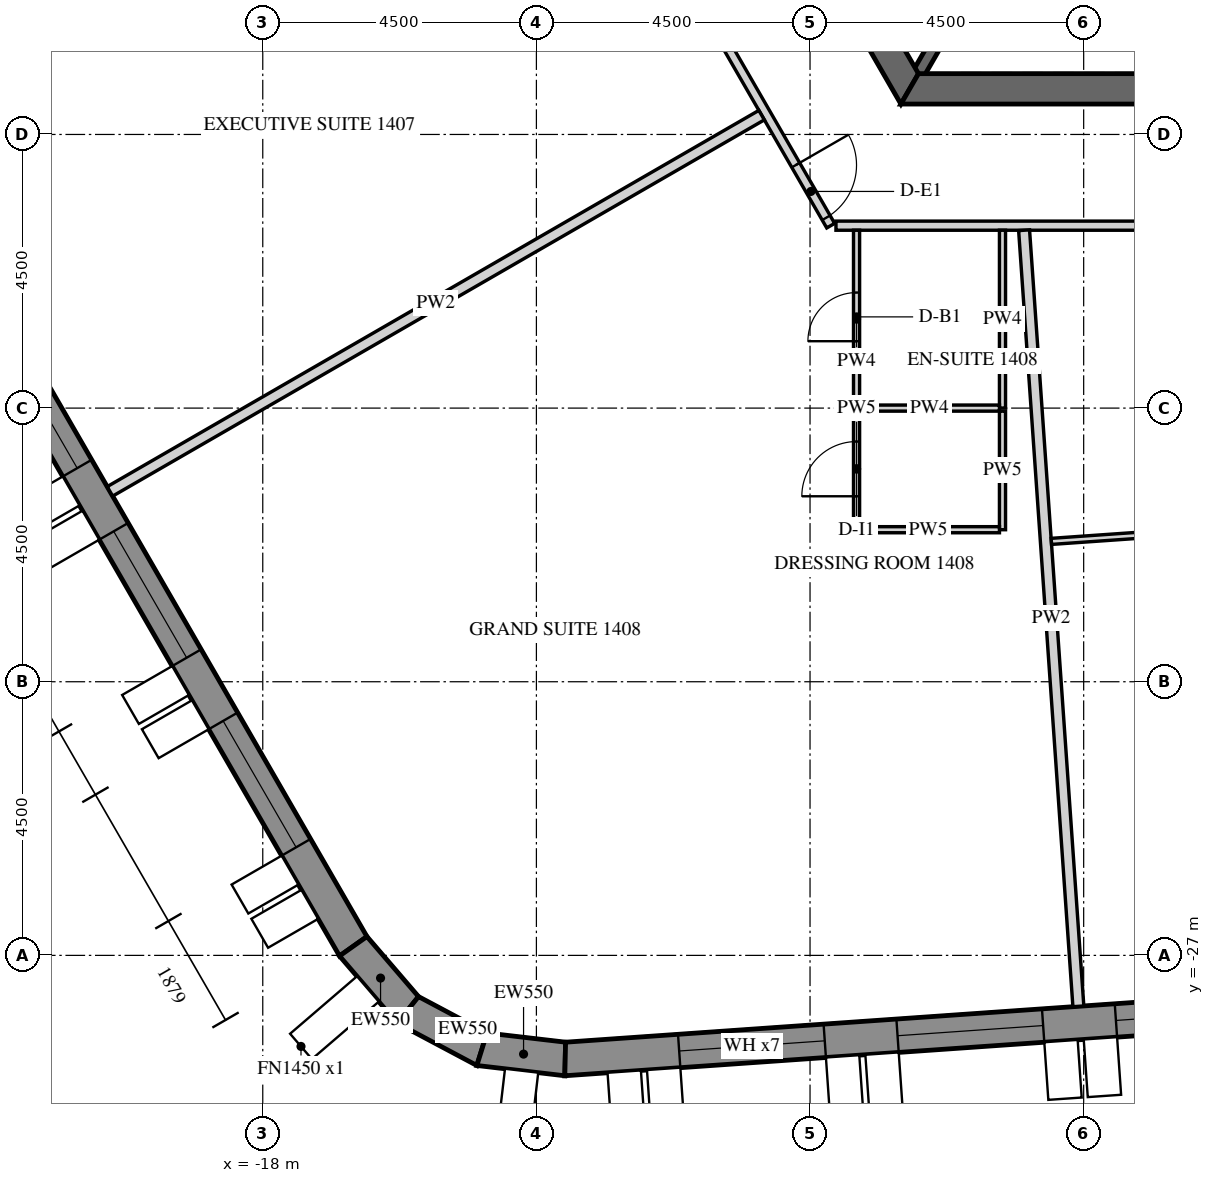
"""IFC4 building model, lengths in metres.
Left out: names, types, materials, properties, quantities, classifications, styles, units other than length and angle.
Written with IfcOpenShell. Run it as: python <this file> out.ifc"""

import sys

from ifc_helpers import new_model, si_unit, direction, frame, frame_2d, origin, place, context, subcontext, project, spatial, polyline, rectangle, outline, extrude, element, fill, save


model = new_model("IFC4")
c1 = context("Model", 3, precision=1e-05, world=origin(), true_north=direction((0.0, 1.0)))
c2 = subcontext(c1, "Body", "Model", "MODEL_VIEW")
j1 = project(units=[si_unit("LENGTHUNIT", "METRE"), si_unit("PLANEANGLEUNIT", "RADIAN")], contexts=[c1])
p1 = place(None, origin())
s1 = spatial("IfcSite", under=j1, at=p1, CompositionType="ELEMENT")
p2 = place(p1, origin())
s2 = spatial("IfcBuilding", under=s1, at=p2, CompositionType="ELEMENT")
p3 = place(p2, frame((0.0, 0.0, 183.9)))
s3 = spatial("IfcBuildingStorey", under=s2, at=p3, CompositionType="ELEMENT", Elevation=183.9)
p4 = place(p3, frame((-30.391, -2.811, -0.15), z_axis=(0.0, 0.0, 1.0), x_axis=(0.499998569178, -0.866026229868, 0.0)))
e1 = element("IfcWall", 1, at=p4, inside=s3, PredefinedType="SOLIDWALL", context=c2, shape_type="SweptSolid", body=[
    extrude(outline(polyline([(-0.022, -0.275), (27.783, -0.275), (27.732, 0.275), (0.022, 0.275), (-0.022, -0.275)])), origin(), (0.0, 0.0, 1.0), 3.9),
])
p5 = place(p4, frame((1.879, 0.0, 1.05)))
e2 = element("IfcOpeningElement", 2, at=p5, cuts=e1, PredefinedType="OPENING", context=c2, shape_type="SweptSolid", body=[
    extrude(rectangle(XDim=2.4, YDim=2.4, at=frame_2d((1.2, 1.2))), frame((0.0, 0.285, 0.0), z_axis=(0.0, -1.0, 0.0), x_axis=(1.0, 0.0, 0.0)), (0.0, 0.0, 1.0), 0.57),
])
p6 = place(p4, frame((5.479, 0.0, 1.05)))
e3 = element("IfcOpeningElement", 3, at=p6, cuts=e1, PredefinedType="OPENING", context=c2, shape_type="SweptSolid", body=[
    extrude(rectangle(XDim=2.4, YDim=2.4, at=frame_2d((1.2, 1.2))), frame((0.0, 0.285, 0.0), z_axis=(0.0, -1.0, 0.0), x_axis=(1.0, 0.0, 0.0)), (0.0, 0.0, 1.0), 0.57),
])
p7 = place(p4, frame((9.079, 0.0, 1.05)))
e4 = element("IfcOpeningElement", 4, at=p7, cuts=e1, PredefinedType="OPENING", context=c2, shape_type="SweptSolid", body=[
    extrude(rectangle(XDim=2.4, YDim=2.4, at=frame_2d((1.2, 1.2))), frame((0.0, 0.285, 0.0), z_axis=(0.0, -1.0, 0.0), x_axis=(1.0, 0.0, 0.0)), (0.0, 0.0, 1.0), 0.57),
])
p8 = place(p4, frame((12.679, 0.0, 1.05)))
e5 = element("IfcOpeningElement", 5, at=p8, cuts=e1, PredefinedType="OPENING", context=c2, shape_type="SweptSolid", body=[
    extrude(rectangle(XDim=2.4, YDim=2.4, at=frame_2d((1.2, 1.2))), frame((0.0, 0.285, 0.0), z_axis=(0.0, -1.0, 0.0), x_axis=(1.0, 0.0, 0.0)), (0.0, 0.0, 1.0), 0.57),
])
p9 = place(p4, frame((16.279, 0.0, 1.05)))
e6 = element("IfcOpeningElement", 6, at=p9, cuts=e1, PredefinedType="OPENING", context=c2, shape_type="SweptSolid", body=[
    extrude(rectangle(XDim=2.4, YDim=2.4, at=frame_2d((1.2, 1.2))), frame((0.0, 0.285, 0.0), z_axis=(0.0, -1.0, 0.0), x_axis=(1.0, 0.0, 0.0)), (0.0, 0.0, 1.0), 0.57),
])
p10 = place(p4, frame((19.879, 0.0, 1.05)))
e7 = element("IfcOpeningElement", 7, at=p10, cuts=e1, PredefinedType="OPENING", context=c2, shape_type="SweptSolid", body=[
    extrude(rectangle(XDim=2.4, YDim=2.4, at=frame_2d((1.2, 1.2))), frame((0.0, 0.285, 0.0), z_axis=(0.0, -1.0, 0.0), x_axis=(1.0, 0.0, 0.0)), (0.0, 0.0, 1.0), 0.57),
])
p11 = place(p4, frame((23.479, 0.0, 1.05)))
e8 = element("IfcOpeningElement", 8, at=p11, cuts=e1, PredefinedType="OPENING", context=c2, shape_type="SweptSolid", body=[
    extrude(rectangle(XDim=2.4, YDim=2.4, at=frame_2d((1.2, 1.2))), frame((0.0, 0.285, 0.0), z_axis=(0.0, -1.0, 0.0), x_axis=(1.0, 0.0, 0.0)), (0.0, 0.0, 1.0), 0.57),
])
p12 = place(p3, frame((-16.512, -26.85, -0.15), z_axis=(0.0, 0.0, 1.0), x_axis=(0.651621950847, -0.758543890078, 0.0)))
e9 = element("IfcWall", 9, at=p12, inside=s3, PredefinedType="SOLIDWALL", context=c2, shape_type="SweptSolid", body=[
    extrude(outline(polyline([(-0.026, -0.275), (1.431, -0.275), (1.327, 0.275), (0.026, 0.275), (-0.026, -0.275)])), origin(), (0.0, 0.0, 1.0), 3.9),
])
p13 = place(p3, frame((-15.614, -27.896, -0.15), z_axis=(0.0, 0.0, 1.0), x_axis=(0.882994189209, -0.469383917304, 0.0)))
e10 = element("IfcWall", 10, at=p13, inside=s3, PredefinedType="SOLIDWALL", context=c2, shape_type="SweptSolid", body=[
    extrude(outline(polyline([(-0.052, -0.275), (1.431, -0.275), (1.327, 0.275), (0.052, 0.275), (-0.052, -0.275)])), origin(), (0.0, 0.0, 1.0), 3.9),
])
p14 = place(p3, frame((-14.396, -28.543, -0.15), z_axis=(0.0, 0.0, 1.0), x_axis=(0.993232537394, -0.11614269956, 0.0)))
e11 = element("IfcWall", 11, at=p14, inside=s3, PredefinedType="SOLIDWALL", context=c2, shape_type="SweptSolid", body=[
    extrude(outline(polyline([(-0.052, -0.275), (1.405, -0.275), (1.353, 0.275), (0.052, 0.275), (-0.052, -0.275)])), origin(), (0.0, 0.0, 1.0), 3.9),
])
p15 = place(p3, frame((-13.026, -28.704, -0.15), z_axis=(0.0, 0.0, 1.0), x_axis=(0.99756406806, 0.069756219185, 0.0)))
e12 = element("IfcWall", 12, at=p15, inside=s3, PredefinedType="SOLIDWALL", context=c2, shape_type="SweptSolid", body=[
    extrude(outline(polyline([(-0.026, -0.275), (27.78, -0.275), (27.735, 0.275), (0.026, 0.275), (-0.026, -0.275)])), origin(), (0.0, 0.0, 1.0), 3.9),
])
p16 = place(p15, frame((1.879, 0.0, 1.05)))
e13 = element("IfcOpeningElement", 13, at=p16, cuts=e12, PredefinedType="OPENING", context=c2, shape_type="SweptSolid", body=[
    extrude(rectangle(XDim=2.4, YDim=2.4, at=frame_2d((1.2, 1.2))), frame((0.0, 0.285, 0.0), z_axis=(0.0, -1.0, 0.0), x_axis=(1.0, 0.0, 0.0)), (0.0, 0.0, 1.0), 0.57),
])
p17 = place(p15, frame((5.479, 0.0, 1.05)))
e14 = element("IfcOpeningElement", 14, at=p17, cuts=e12, PredefinedType="OPENING", context=c2, shape_type="SweptSolid", body=[
    extrude(rectangle(XDim=2.4, YDim=2.4, at=frame_2d((1.2, 1.2))), frame((0.0, 0.285, 0.0), z_axis=(0.0, -1.0, 0.0), x_axis=(1.0, 0.0, 0.0)), (0.0, 0.0, 1.0), 0.57),
])
p18 = place(p15, frame((9.079, 0.0, 1.05)))
e15 = element("IfcOpeningElement", 15, at=p18, cuts=e12, PredefinedType="OPENING", context=c2, shape_type="SweptSolid", body=[
    extrude(rectangle(XDim=2.4, YDim=2.4, at=frame_2d((1.2, 1.2))), frame((0.0, 0.285, 0.0), z_axis=(0.0, -1.0, 0.0), x_axis=(1.0, 0.0, 0.0)), (0.0, 0.0, 1.0), 0.57),
])
p19 = place(p15, frame((12.679, 0.0, 1.05)))
e16 = element("IfcOpeningElement", 16, at=p19, cuts=e12, PredefinedType="OPENING", context=c2, shape_type="SweptSolid", body=[
    extrude(rectangle(XDim=2.4, YDim=2.4, at=frame_2d((1.2, 1.2))), frame((0.0, 0.285, 0.0), z_axis=(0.0, -1.0, 0.0), x_axis=(1.0, 0.0, 0.0)), (0.0, 0.0, 1.0), 0.57),
])
p20 = place(p15, frame((16.279, 0.0, 1.05)))
e17 = element("IfcOpeningElement", 17, at=p20, cuts=e12, PredefinedType="OPENING", context=c2, shape_type="SweptSolid", body=[
    extrude(rectangle(XDim=2.4, YDim=2.4, at=frame_2d((1.2, 1.2))), frame((0.0, 0.285, 0.0), z_axis=(0.0, -1.0, 0.0), x_axis=(1.0, 0.0, 0.0)), (0.0, 0.0, 1.0), 0.57),
])
p21 = place(p15, frame((19.879, 0.0, 1.05)))
e18 = element("IfcOpeningElement", 18, at=p21, cuts=e12, PredefinedType="OPENING", context=c2, shape_type="SweptSolid", body=[
    extrude(rectangle(XDim=2.4, YDim=2.4, at=frame_2d((1.2, 1.2))), frame((0.0, 0.285, 0.0), z_axis=(0.0, -1.0, 0.0), x_axis=(1.0, 0.0, 0.0)), (0.0, 0.0, 1.0), 0.57),
])
p22 = place(p15, frame((23.479, 0.0, 1.05)))
e19 = element("IfcOpeningElement", 19, at=p22, cuts=e12, PredefinedType="OPENING", context=c2, shape_type="SweptSolid", body=[
    extrude(rectangle(XDim=2.4, YDim=2.4, at=frame_2d((1.2, 1.2))), frame((0.0, 0.285, 0.0), z_axis=(0.0, -1.0, 0.0), x_axis=(1.0, 0.0, 0.0)), (0.0, 0.0, 1.0), 0.57),
])
p23 = place(p3, frame((-14.722, 0.0, -0.15), z_axis=(0.0, 0.0, 1.0), x_axis=(0.50000571537, -0.866022103989, 0.0)))
e20 = element("IfcWall", 20, at=p23, inside=s3, PredefinedType="SHEAR", context=c2, shape_type="SweptSolid", body=[
    extrude(outline(polyline([(-0.144, -0.25), (14.867, -0.25), (14.578, 0.25), (0.144, 0.25), (-0.144, -0.25)])), origin(), (0.0, 0.0, 1.0), 3.9),
])
p24 = place(p23, frame((6.432, 0.0, 0.15)))
e21 = element("IfcOpeningElement", 21, at=p24, cuts=e20, PredefinedType="OPENING", context=c2, shape_type="SweptSolid", body=[
    extrude(rectangle(XDim=1.8, YDim=2.4, at=frame_2d((0.9, 1.2))), frame((0.0, 0.26, 0.0), z_axis=(0.0, -1.0, 0.0), x_axis=(1.0, 0.0, 0.0)), (0.0, 0.0, 1.0), 0.52),
])
p25 = place(p3, frame((-7.361, -12.75, -0.15), z_axis=(0.0, 0.0, 1.0), x_axis=(1.0, 0.0, 0.0)))
e22 = element("IfcWall", 22, at=p25, inside=s3, PredefinedType="SHEAR", context=c2, shape_type="SweptSolid", body=[
    extrude(outline(polyline([(-0.144, -0.25), (14.866, -0.25), (14.578, 0.25), (0.144, 0.25), (-0.144, -0.25)])), origin(), (0.0, 0.0, 1.0), 3.9),
])
p26 = place(p25, frame((6.761, 0.0, 0.15)))
e23 = element("IfcOpeningElement", 23, at=p26, cuts=e22, PredefinedType="OPENING", context=c2, shape_type="SweptSolid", body=[
    extrude(rectangle(XDim=1.2, YDim=2.4, at=frame_2d((0.6, 1.2))), frame((0.0, 0.26, 0.0), z_axis=(0.0, -1.0, 0.0), x_axis=(1.0, 0.0, 0.0)), (0.0, 0.0, 1.0), 0.52),
])
p27 = place(p3, frame((-5.773, -10.0, -0.15), z_axis=(0.0, 0.0, 1.0), x_axis=(-0.499995765644, -0.866027848477, 0.0)))
e24 = element("IfcWall", 24, at=p27, inside=s3, PredefinedType="SHEAR", context=c2, shape_type="SweptSolid", body=[
    extrude(rectangle(XDim=2.887, YDim=0.2, at=frame_2d((1.443, 0.0))), origin(), (0.0, 0.0, 1.0), 3.9),
])
p28 = place(p3, frame((-16.094, -2.125, 0.0), z_axis=(0.0, 0.0, 1.0), x_axis=(0.500010545262, -0.866019315389, 0.0)))
e25 = element("IfcWall", 25, at=p28, inside=s3, PredefinedType="PARTITIONING", context=c2, shape_type="SweptSolid", body=[
    extrude(rectangle(XDim=14.867, YDim=0.15, at=frame_2d((7.434, 0.0))), origin(), (0.0, 0.0, 1.0), 2.988),
])
p29 = place(p28, frame((1.019, 0.0, 0.0)))
e26 = element("IfcOpeningElement", 26, at=p29, cuts=e25, PredefinedType="OPENING", context=c2, shape_type="SweptSolid", body=[
    extrude(rectangle(XDim=1.0, YDim=2.1, at=frame_2d((0.5, 1.05))), frame((0.0, 0.085, 0.0), z_axis=(0.0, -1.0, 0.0), x_axis=(1.0, 0.0, 0.0)), (0.0, 0.0, 1.0), 0.17),
])
p30 = place(p28, frame((9.824, 0.0, 0.0)))
e27 = element("IfcOpeningElement", 27, at=p30, cuts=e25, PredefinedType="OPENING", context=c2, shape_type="SweptSolid", body=[
    extrude(rectangle(XDim=1.0, YDim=2.1, at=frame_2d((0.5, 1.05))), frame((0.0, 0.085, 0.0), z_axis=(0.0, -1.0, 0.0), x_axis=(1.0, 0.0, 0.0)), (0.0, 0.0, 1.0), 0.17),
])
p31 = place(p28, frame((13.717, 0.0, 0.0)))
e28 = element("IfcOpeningElement", 28, at=p31, cuts=e25, PredefinedType="OPENING", context=c2, shape_type="SweptSolid", body=[
    extrude(rectangle(XDim=1.0, YDim=2.1, at=frame_2d((0.5, 1.05))), frame((0.0, 0.085, 0.0), z_axis=(0.0, -1.0, 0.0), x_axis=(1.0, 0.0, 0.0)), (0.0, 0.0, 1.0), 0.17),
])
p32 = place(p3, frame((-8.574, -15.0, 0.0), z_axis=(0.0, 0.0, 1.0), x_axis=(1.0, 0.0, 0.0)))
e29 = element("IfcWall", 29, at=p32, inside=s3, PredefinedType="PARTITIONING", context=c2, shape_type="SweptSolid", body=[
    extrude(rectangle(XDim=14.78, YDim=0.15, at=frame_2d((7.39, 0.0))), origin(), (0.0, 0.0, 1.0), 2.988),
])
p33 = place(p32, frame((7.081, 0.0, 0.0)))
e30 = element("IfcOpeningElement", 30, at=p33, cuts=e29, PredefinedType="OPENING", context=c2, shape_type="SweptSolid", body=[
    extrude(rectangle(XDim=1.0, YDim=2.1, at=frame_2d((0.5, 1.05))), frame((0.0, 0.085, 0.0), z_axis=(0.0, -1.0, 0.0), x_axis=(1.0, 0.0, 0.0)), (0.0, 0.0, 1.0), 0.17),
])
for number, where, z_axis, x_axis in (
    (31, (-24.114, -13.134, 0.0), (0.0, 0.0, 1.0), (0.866, 0.5, 0.0)),
    (32, (-20.513, -19.37, 0.0), (0.0, 0.0, 1.0), (0.866, 0.5, 0.0)),
):
    element("IfcWall", number, at=place(p3, frame(where, z_axis=z_axis, x_axis=x_axis)), inside=s3, PredefinedType="PARTITIONING", context=c2, shape_type="SweptSolid", body=[
        extrude(rectangle(XDim=12.375, YDim=0.18, at=frame_2d((6.188, 0.0))), origin(), (0.0, 0.0, 1.0), 2.988),
    ])
p34 = place(p3, frame((-8.235, -18.0, 0.0), z_axis=(0.0, 0.0, 1.0), x_axis=(0.0, 1.0, 0.0)))
e33 = element("IfcWall", 33, at=p34, inside=s3, PredefinedType="PARTITIONING", context=c2, shape_type="SweptSolid", body=[
    extrude(rectangle(XDim=2.925, YDim=0.1, at=frame_2d((1.462, 0.0))), origin(), (0.0, 0.0, 1.0), 2.988),
])
p35 = place(p34, frame((1.1, 0.0, 0.0)))
e34 = element("IfcOpeningElement", 34, at=p35, cuts=e33, PredefinedType="OPENING", context=c2, shape_type="SweptSolid", body=[
    extrude(rectangle(XDim=0.8, YDim=2.1, at=frame_2d((0.4, 1.05))), frame((0.0, 0.06, 0.0), z_axis=(0.0, -1.0, 0.0), x_axis=(1.0, 0.0, 0.0)), (0.0, 0.0, 1.0), 0.12),
])
p36 = place(p3, frame((-5.835, -15.075, 0.0), z_axis=(0.0, 0.0, 1.0), x_axis=(0.0, -1.0, 0.0)))
e35 = element("IfcWall", 35, at=p36, inside=s3, PredefinedType="PARTITIONING", context=c2, shape_type="SweptSolid", body=[
    extrude(rectangle(XDim=2.925, YDim=0.1, at=frame_2d((1.462, 0.0))), origin(), (0.0, 0.0, 1.0), 2.988),
])
p37 = place(p3, frame((-5.835, -18.05, 0.0), z_axis=(0.0, 0.0, 1.0), x_axis=(0.0, -1.0, 0.0)))
e36 = element("IfcWall", 36, at=p37, inside=s3, PredefinedType="PARTITIONING", context=c2, shape_type="SweptSolid", body=[
    extrude(rectangle(XDim=1.95, YDim=0.1, at=frame_2d((0.975, 0.0))), origin(), (0.0, 0.0, 1.0), 2.988),
])
p38 = place(p3, frame((-5.885, -20.0, 0.0), z_axis=(0.0, 0.0, 1.0), x_axis=(-1.0, 0.0, 0.0)))
e37 = element("IfcWall", 37, at=p38, inside=s3, PredefinedType="PARTITIONING", context=c2, shape_type="SweptSolid", body=[
    extrude(rectangle(XDim=2.35, YDim=0.1, at=frame_2d((1.175, 0.0))), origin(), (0.0, 0.0, 1.0), 2.988),
])
p39 = place(p3, frame((-8.235, -19.95, 0.0), z_axis=(0.0, 0.0, 1.0), x_axis=(0.0, 1.0, 0.0)))
e38 = element("IfcWall", 38, at=p39, inside=s3, PredefinedType="PARTITIONING", context=c2, shape_type="SweptSolid", body=[
    extrude(rectangle(XDim=1.9, YDim=0.1, at=frame_2d((0.95, 0.0))), origin(), (0.0, 0.0, 1.0), 2.988),
])
p40 = place(p39, frame((0.5, 0.0, 0.0)))
e39 = element("IfcOpeningElement", 39, at=p40, cuts=e38, PredefinedType="OPENING", context=c2, shape_type="SweptSolid", body=[
    extrude(rectangle(XDim=0.9, YDim=2.1, at=frame_2d((0.45, 1.05))), frame((0.0, 0.06, 0.0), z_axis=(0.0, -1.0, 0.0), x_axis=(1.0, 0.0, 0.0)), (0.0, 0.0, 1.0), 0.12),
])
p41 = place(p3, frame((-4.587, -27.838, 0.0), z_axis=(0.0, 0.0, 1.0), x_axis=(-0.069764754112, 0.997563471206, 0.0)))
e40 = element("IfcWall", 40, at=p41, inside=s3, PredefinedType="PARTITIONING", context=c2, shape_type="SweptSolid", body=[
    extrude(rectangle(XDim=12.794, YDim=0.18, at=frame_2d((6.397, 0.0))), origin(), (0.0, 0.0, 1.0), 2.988),
])
p42 = place(p3, frame((-8.185, -18.0, 0.0), z_axis=(0.0, 0.0, 1.0), x_axis=(1.0, 0.0, 0.0)))
e41 = element("IfcWall", 41, at=p42, inside=s3, PredefinedType="PARTITIONING", context=c2, shape_type="SweptSolid", body=[
    extrude(rectangle(XDim=2.3, YDim=0.1, at=frame_2d((1.15, 0.0))), origin(), (0.0, 0.0, 1.0), 2.988),
])
p43 = place(p3, frame((-5.032, -20.192, 0.0), z_axis=(0.0, 0.0, 1.0), x_axis=(0.997562888251, 0.069773089251, 0.0)))
e42 = element("IfcWall", 42, at=p43, inside=s3, PredefinedType="PARTITIONING", context=c2, shape_type="SweptSolid", body=[
    extrude(rectangle(XDim=7.11, YDim=0.1, at=frame_2d((3.555, 0.0))), origin(), (0.0, 0.0, 1.0), 2.988),
])
p44 = place(p43, frame((3.06, 0.0, 0.0)))
e43 = element("IfcOpeningElement", 43, at=p44, cuts=e42, PredefinedType="OPENING", context=c2, shape_type="SweptSolid", body=[
    extrude(rectangle(XDim=0.9, YDim=2.1, at=frame_2d((0.45, 1.05))), frame((0.0, 0.06, 0.0), z_axis=(0.0, -1.0, 0.0), x_axis=(1.0, 0.0, 0.0)), (0.0, 0.0, 1.0), 0.12),
])
p45 = place(p9, frame((0.0, 0.205, 0.0)))
e44 = element("IfcWindow", 44, at=p45, inside=s3, PartitioningType="DOUBLE_PANEL_VERTICAL", PredefinedType="WINDOW", context=c2, shape_type="SweptSolid", body=[
    extrude(rectangle(XDim=2.4, YDim=2.4, at=frame_2d((1.2, 1.2))), frame((0.0, 0.03, 0.0), z_axis=(0.0, -1.0, 0.0), x_axis=(1.0, 0.0, 0.0)), (0.0, 0.0, 1.0), 0.06),
])
fill(e6, e44)
p46 = place(p10, frame((0.0, 0.205, 0.0)))
e45 = element("IfcWindow", 45, at=p46, inside=s3, PartitioningType="DOUBLE_PANEL_VERTICAL", PredefinedType="WINDOW", context=c2, shape_type="SweptSolid", body=[
    extrude(rectangle(XDim=2.4, YDim=2.4, at=frame_2d((1.2, 1.2))), frame((0.0, 0.03, 0.0), z_axis=(0.0, -1.0, 0.0), x_axis=(1.0, 0.0, 0.0)), (0.0, 0.0, 1.0), 0.06),
])
fill(e7, e45)
p47 = place(p11, frame((0.0, 0.205, 0.0)))
e46 = element("IfcWindow", 46, at=p47, inside=s3, PartitioningType="DOUBLE_PANEL_VERTICAL", PredefinedType="WINDOW", context=c2, shape_type="SweptSolid", body=[
    extrude(rectangle(XDim=2.4, YDim=2.4, at=frame_2d((1.2, 1.2))), frame((0.0, 0.03, 0.0), z_axis=(0.0, -1.0, 0.0), x_axis=(1.0, 0.0, 0.0)), (0.0, 0.0, 1.0), 0.06),
])
fill(e8, e46)
p48 = place(p16, frame((0.0, 0.205, 0.0)))
e47 = element("IfcWindow", 47, at=p48, inside=s3, PartitioningType="DOUBLE_PANEL_VERTICAL", PredefinedType="WINDOW", context=c2, shape_type="SweptSolid", body=[
    extrude(rectangle(XDim=2.4, YDim=2.4, at=frame_2d((1.2, 1.2))), frame((0.0, 0.03, 0.0), z_axis=(0.0, -1.0, 0.0), x_axis=(1.0, 0.0, 0.0)), (0.0, 0.0, 1.0), 0.06),
])
fill(e13, e47)
p49 = place(p17, frame((0.0, 0.205, 0.0)))
e48 = element("IfcWindow", 48, at=p49, inside=s3, PartitioningType="DOUBLE_PANEL_VERTICAL", PredefinedType="WINDOW", context=c2, shape_type="SweptSolid", body=[
    extrude(rectangle(XDim=2.4, YDim=2.4, at=frame_2d((1.2, 1.2))), frame((0.0, 0.03, 0.0), z_axis=(0.0, -1.0, 0.0), x_axis=(1.0, 0.0, 0.0)), (0.0, 0.0, 1.0), 0.06),
])
fill(e14, e48)
p50 = place(p18, frame((0.0, 0.205, 0.0)))
e49 = element("IfcWindow", 49, at=p50, inside=s3, PartitioningType="DOUBLE_PANEL_VERTICAL", PredefinedType="WINDOW", context=c2, shape_type="SweptSolid", body=[
    extrude(rectangle(XDim=2.4, YDim=2.4, at=frame_2d((1.2, 1.2))), frame((0.0, 0.03, 0.0), z_axis=(0.0, -1.0, 0.0), x_axis=(1.0, 0.0, 0.0)), (0.0, 0.0, 1.0), 0.06),
])
fill(e15, e49)
p51 = place(p31, origin())
e50 = element("IfcDoor", 50, at=p51, inside=s3, OperationType="SINGLE_SWING_LEFT", PredefinedType="DOOR", context=c2, shape_type="SweptSolid", body=[
    extrude(rectangle(XDim=1.0, YDim=2.1, at=frame_2d((0.5, 1.05))), frame((0.0, 0.025, 0.0), z_axis=(0.0, -1.0, 0.0), x_axis=(1.0, 0.0, 0.0)), (0.0, 0.0, 1.0), 0.05),
])
fill(e28, e50)
p52 = place(p35, origin())
e51 = element("IfcDoor", 51, at=p52, inside=s3, OperationType="SINGLE_SWING_LEFT", PredefinedType="DOOR", context=c2, shape_type="SweptSolid", body=[
    extrude(rectangle(XDim=0.8, YDim=2.1, at=frame_2d((0.4, 1.05))), frame((0.0, 0.025, 0.0), z_axis=(0.0, -1.0, 0.0), x_axis=(1.0, 0.0, 0.0)), (0.0, 0.0, 1.0), 0.05),
])
fill(e34, e51)
p53 = place(p40, origin())
e52 = element("IfcDoor", 52, at=p53, inside=s3, OperationType="SINGLE_SWING_LEFT", PredefinedType="DOOR", context=c2, shape_type="SweptSolid", body=[
    extrude(rectangle(XDim=0.9, YDim=2.1, at=frame_2d((0.45, 1.05))), frame((0.0, 0.025, 0.0), z_axis=(0.0, -1.0, 0.0), x_axis=(1.0, 0.0, 0.0)), (0.0, 0.0, 1.0), 0.05),
])
fill(e39, e52)
save(model, sys.argv[1])
